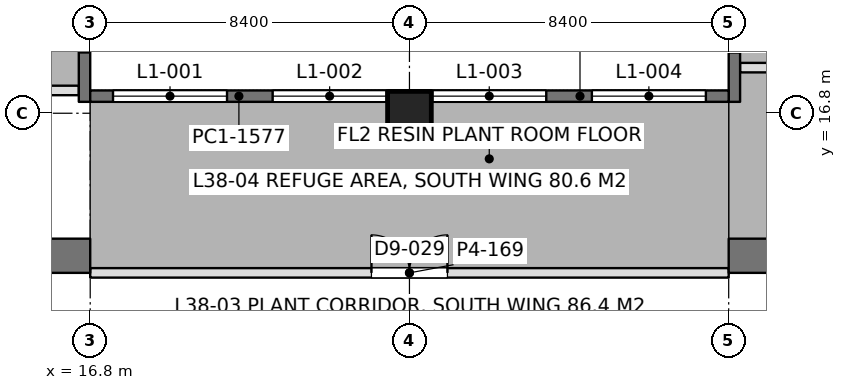
"""IFC4 building model, lengths in metres.
Left out: names, types, materials, properties, quantities, classifications, styles, units other than length and angle.
Written with IfcOpenShell. Run it as: python <this file> out.ifc"""

import sys

from ifc_helpers import new_model, si_unit, direction, frame, frame_2d, origin, origin_2d, place, context, subcontext, project, spatial, rectangle, extrude, element, fill, save


model = new_model("IFC4")
c1 = context("Model", 3, precision=1e-05, world=origin(), true_north=direction((0.0, 1.0)))
c2 = subcontext(c1, "Body", "Model", "MODEL_VIEW")
j1 = project(units=[si_unit("LENGTHUNIT", "METRE"), si_unit("PLANEANGLEUNIT", "RADIAN")], contexts=[c1])
p1 = place(None, origin())
s1 = spatial("IfcSite", under=j1, at=p1, CompositionType="ELEMENT")
p2 = place(p1, origin())
s2 = spatial("IfcBuilding", under=s1, at=p2, CompositionType="ELEMENT")
p3 = place(p2, frame((0.0, 0.0, 168.0)))
s3 = spatial("IfcBuildingStorey", under=s2, at=p3, CompositionType="ELEMENT", Elevation=168.0)
p4 = place(p3, frame((25.2, 16.8, 0.0), z_axis=(0.0, 0.0, 1.0), x_axis=(1.0, 0.0, 0.0)))
e1 = element("IfcColumn", 1, at=p4, inside=s3, PredefinedType="COLUMN", context=c2, shape_type="SweptSolid", body=[
    extrude(rectangle(XDim=1.15, YDim=1.15, at=origin_2d()), origin(), (0.0, 0.0, 1.0), 5.4),
])
p5 = place(p3, frame((-1.2, 13.05, 0.0), z_axis=(0.0, 0.0, 1.0), x_axis=(1.0, 0.0, 0.0)))
e2 = element("IfcWall", 2, at=p5, inside=s3, PredefinedType="SHEAR", context=c2, shape_type="SweptSolid", body=[
    extrude(rectangle(XDim=18.0, YDim=0.9, at=frame_2d((9.0, 0.0))), origin(), (0.0, 0.0, 1.0), 5.4),
])
p6 = place(p5, frame((8.95, 0.0, 0.0)))
e3 = element("IfcOpeningElement", 3, at=p6, cuts=e2, PredefinedType="OPENING", context=c2, shape_type="SweptSolid", body=[
    extrude(rectangle(XDim=1.8, YDim=2.4, at=frame_2d((0.9, 1.2))), frame((0.0, 0.46, 0.0), z_axis=(0.0, -1.0, 0.0), x_axis=(1.0, 0.0, 0.0)), (0.0, 0.0, 1.0), 0.92),
])
p7 = place(p3, frame((33.6, 13.05, 0.0), z_axis=(0.0, 0.0, 1.0), x_axis=(1.0, 0.0, 0.0)))
e4 = element("IfcWall", 4, at=p7, inside=s3, PredefinedType="SHEAR", context=c2, shape_type="SweptSolid", body=[
    extrude(rectangle(XDim=18.0, YDim=0.9, at=frame_2d((9.0, 0.0))), origin(), (0.0, 0.0, 1.0), 5.4),
])
p8 = place(p7, frame((7.25, 0.0, 0.0)))
e5 = element("IfcOpeningElement", 5, at=p8, cuts=e4, PredefinedType="OPENING", context=c2, shape_type="SweptSolid", body=[
    extrude(rectangle(XDim=1.8, YDim=2.4, at=frame_2d((0.9, 1.2))), frame((0.0, 0.46, 0.0), z_axis=(0.0, -1.0, 0.0), x_axis=(1.0, 0.0, 0.0)), (0.0, 0.0, 1.0), 0.92),
])
p9 = place(p3, frame((16.65, 17.1, 0.0), z_axis=(0.0, 0.0, 1.0), x_axis=(0.0, 1.0, 0.0)))
e6 = element("IfcWall", 6, at=p9, inside=s3, PredefinedType="SOLIDWALL", context=c2, shape_type="SweptSolid", body=[
    extrude(rectangle(XDim=5.0, YDim=0.3, at=frame_2d((2.5, 0.0))), origin(), (0.0, 0.0, 1.0), 5.25),
])
p10 = place(p9, frame((1.3, 0.0, 1.2)))
e7 = element("IfcOpeningElement", 7, at=p10, cuts=e6, PredefinedType="OPENING", context=c2, shape_type="SweptSolid", body=[
    extrude(rectangle(XDim=2.4, YDim=2.4, at=frame_2d((1.2, 1.2))), frame((0.0, 0.16, 0.0), z_axis=(0.0, -1.0, 0.0), x_axis=(1.0, 0.0, 0.0)), (0.0, 0.0, 1.0), 0.32),
])
p11 = place(p3, frame((33.75, 17.1, 0.0), z_axis=(0.0, 0.0, 1.0), x_axis=(0.0, 1.0, 0.0)))
e8 = element("IfcWall", 8, at=p11, inside=s3, PredefinedType="SOLIDWALL", context=c2, shape_type="SweptSolid", body=[
    extrude(rectangle(XDim=5.0, YDim=0.3, at=frame_2d((2.5, 0.0))), origin(), (0.0, 0.0, 1.0), 5.25),
])
p12 = place(p11, frame((1.3, 0.0, 1.2)))
e9 = element("IfcOpeningElement", 9, at=p12, cuts=e8, PredefinedType="OPENING", context=c2, shape_type="SweptSolid", body=[
    extrude(rectangle(XDim=2.4, YDim=2.4, at=frame_2d((1.2, 1.2))), frame((0.0, 0.16, 0.0), z_axis=(0.0, -1.0, 0.0), x_axis=(1.0, 0.0, 0.0)), (0.0, 0.0, 1.0), 0.32),
])
p13 = place(p3, frame((16.8, 17.25, 0.0), z_axis=(0.0, 0.0, 1.0), x_axis=(1.0, 0.0, 0.0)))
e10 = element("IfcWall", 10, at=p13, inside=s3, PredefinedType="SOLIDWALL", context=c2, shape_type="SweptSolid", body=[
    extrude(rectangle(XDim=7.825, YDim=0.3, at=frame_2d((3.913, 0.0))), origin(), (0.0, 0.0, 1.0), 5.25),
])
p14 = place(p13, frame((0.6, 0.0, 1.2)))
e11 = element("IfcOpeningElement", 11, at=p14, cuts=e10, PredefinedType="OPENING", context=c2, shape_type="SweptSolid", body=[
    extrude(rectangle(XDim=3.0, YDim=2.4, at=frame_2d((1.5, 1.2))), frame((0.0, 0.16, 0.0), z_axis=(0.0, -1.0, 0.0), x_axis=(1.0, 0.0, 0.0)), (0.0, 0.0, 1.0), 0.32),
])
p15 = place(p13, frame((4.8, 0.0, 1.2)))
e12 = element("IfcOpeningElement", 12, at=p15, cuts=e10, PredefinedType="OPENING", context=c2, shape_type="SweptSolid", body=[
    extrude(rectangle(XDim=3.0, YDim=2.4, at=frame_2d((1.5, 1.2))), frame((0.0, 0.16, 0.0), z_axis=(0.0, -1.0, 0.0), x_axis=(1.0, 0.0, 0.0)), (0.0, 0.0, 1.0), 0.32),
])
p16 = place(p3, frame((25.775, 17.25, 0.0), z_axis=(0.0, 0.0, 1.0), x_axis=(1.0, 0.0, 0.0)))
e13 = element("IfcWall", 13, at=p16, inside=s3, PredefinedType="SOLIDWALL", context=c2, shape_type="SweptSolid", body=[
    extrude(rectangle(XDim=7.825, YDim=0.3, at=frame_2d((3.913, 0.0))), origin(), (0.0, 0.0, 1.0), 5.25),
])
p17 = place(p16, frame((0.025, 0.0, 1.2)))
e14 = element("IfcOpeningElement", 14, at=p17, cuts=e13, PredefinedType="OPENING", context=c2, shape_type="SweptSolid", body=[
    extrude(rectangle(XDim=3.0, YDim=2.4, at=frame_2d((1.5, 1.2))), frame((0.0, 0.16, 0.0), z_axis=(0.0, -1.0, 0.0), x_axis=(1.0, 0.0, 0.0)), (0.0, 0.0, 1.0), 0.32),
])
p18 = place(p16, frame((4.225, 0.0, 1.2)))
e15 = element("IfcOpeningElement", 15, at=p18, cuts=e13, PredefinedType="OPENING", context=c2, shape_type="SweptSolid", body=[
    extrude(rectangle(XDim=3.0, YDim=2.4, at=frame_2d((1.5, 1.2))), frame((0.0, 0.16, 0.0), z_axis=(0.0, -1.0, 0.0), x_axis=(1.0, 0.0, 0.0)), (0.0, 0.0, 1.0), 0.32),
])
for number, where, z_axis, x_axis in (
    (16, (10.598, 17.4, 0.0), (0.0, 0.0, 1.0), (1.0, 0.0, 0.0)),
    (17, (33.898, 18.0, 0.0), (0.0, 0.0, 1.0), (1.0, 0.0, 0.0)),
):
    element("IfcWall", number, at=place(p3, frame(where, z_axis=z_axis, x_axis=x_axis)), inside=s3, PredefinedType="PARTITIONING", context=c2, shape_type="SweptSolid", body=[
        extrude(rectangle(XDim=5.904, YDim=0.25, at=frame_2d((2.952, 0.0))), origin(), (0.0, 0.0, 1.0), 4.75),
    ])
p19 = place(p3, frame((16.8, 12.6, 0.0), z_axis=(0.0, 0.0, 1.0), x_axis=(1.0, 0.0, 0.0)))
e18 = element("IfcWall", 18, at=p19, inside=s3, PredefinedType="PARTITIONING", context=c2, shape_type="SweptSolid", body=[
    extrude(rectangle(XDim=16.8, YDim=0.25, at=frame_2d((8.4, 0.0))), origin(), (0.0, 0.0, 1.0), 4.725),
])
p20 = place(p19, frame((7.4, 0.0, 0.0)))
e19 = element("IfcOpeningElement", 19, at=p20, cuts=e18, PredefinedType="OPENING", context=c2, shape_type="SweptSolid", body=[
    extrude(rectangle(XDim=2.0, YDim=2.4, at=frame_2d((1.0, 1.2))), frame((0.0, 0.135, 0.0), z_axis=(0.0, -1.0, 0.0), x_axis=(1.0, 0.0, 0.0)), (0.0, 0.0, 1.0), 0.27),
])
p21 = place(p14, origin())
e20 = element("IfcWindow", 20, at=p21, inside=s3, PartitioningType="SINGLE_PANEL", PredefinedType="USERDEFINED", context=c2, shape_type="SweptSolid", body=[
    extrude(rectangle(XDim=3.0, YDim=2.4, at=frame_2d((1.5, 1.2))), frame((0.0, 0.03, 0.0), z_axis=(0.0, -1.0, 0.0), x_axis=(1.0, 0.0, 0.0)), (0.0, 0.0, 1.0), 0.06),
])
fill(e11, e20)
p22 = place(p15, origin())
e21 = element("IfcWindow", 21, at=p22, inside=s3, PartitioningType="SINGLE_PANEL", PredefinedType="USERDEFINED", context=c2, shape_type="SweptSolid", body=[
    extrude(rectangle(XDim=3.0, YDim=2.4, at=frame_2d((1.5, 1.2))), frame((0.0, 0.03, 0.0), z_axis=(0.0, -1.0, 0.0), x_axis=(1.0, 0.0, 0.0)), (0.0, 0.0, 1.0), 0.06),
])
fill(e12, e21)
p23 = place(p17, origin())
e22 = element("IfcWindow", 22, at=p23, inside=s3, PartitioningType="SINGLE_PANEL", PredefinedType="USERDEFINED", context=c2, shape_type="SweptSolid", body=[
    extrude(rectangle(XDim=3.0, YDim=2.4, at=frame_2d((1.5, 1.2))), frame((0.0, 0.03, 0.0), z_axis=(0.0, -1.0, 0.0), x_axis=(1.0, 0.0, 0.0)), (0.0, 0.0, 1.0), 0.06),
])
fill(e14, e22)
p24 = place(p18, origin())
e23 = element("IfcWindow", 23, at=p24, inside=s3, PartitioningType="SINGLE_PANEL", PredefinedType="USERDEFINED", context=c2, shape_type="SweptSolid", body=[
    extrude(rectangle(XDim=3.0, YDim=2.4, at=frame_2d((1.5, 1.2))), frame((0.0, 0.03, 0.0), z_axis=(0.0, -1.0, 0.0), x_axis=(1.0, 0.0, 0.0)), (0.0, 0.0, 1.0), 0.06),
])
fill(e15, e23)
p25 = place(p20, origin())
e24 = element("IfcDoor", 24, at=p25, inside=s3, OperationType="DOUBLE_DOOR_SINGLE_SWING", PredefinedType="DOOR", context=c2, shape_type="SweptSolid", body=[
    extrude(rectangle(XDim=2.0, YDim=2.4, at=frame_2d((1.0, 1.2))), frame((0.0, 0.025, 0.0), z_axis=(0.0, -1.0, 0.0), x_axis=(1.0, 0.0, 0.0)), (0.0, 0.0, 1.0), 0.05),
])
fill(e19, e24)
save(model, sys.argv[1])
